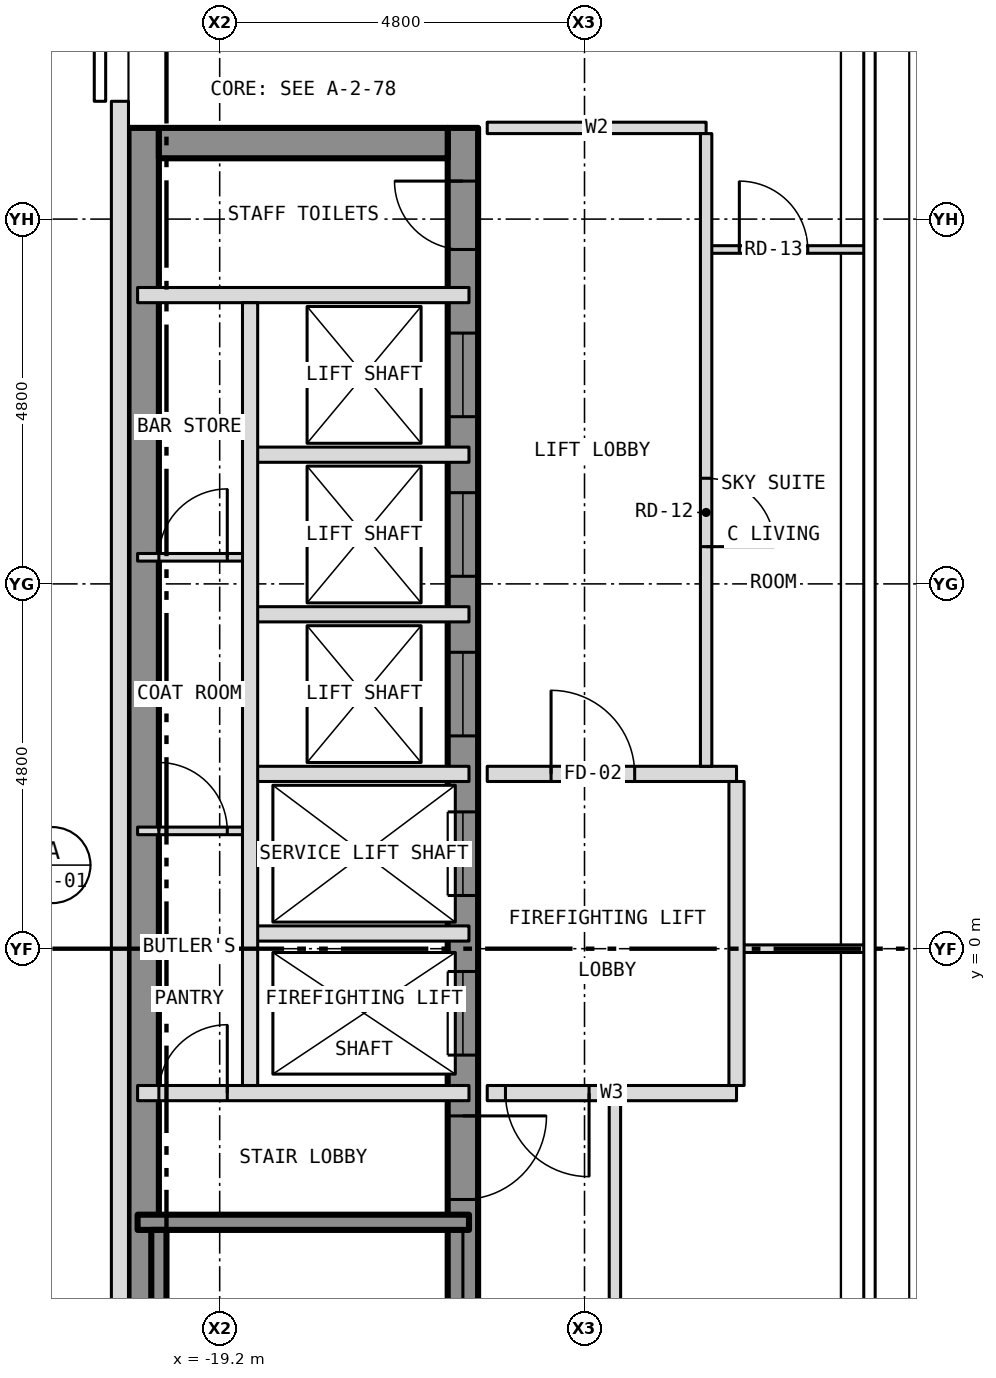
"""IFC4 building model, lengths in metres.
Left out: names, types, materials, properties, quantities, classifications, styles, units other than length and angle.
Written with IfcOpenShell. Run it as: python <this file> out.ifc"""

import sys

from ifc_helpers import new_model, si_unit, direction, frame, frame_2d, origin, place, context, subcontext, project, spatial, rectangle, extrude, element, fill, save


model = new_model("IFC4")
c1 = context("Model", 3, precision=1e-05, world=origin(), true_north=direction((0.0, 1.0)))
c2 = subcontext(c1, "Body", "Model", "MODEL_VIEW")
j1 = project(units=[si_unit("LENGTHUNIT", "METRE"), si_unit("PLANEANGLEUNIT", "RADIAN")], contexts=[c1])
p1 = place(None, origin())
s1 = spatial("IfcSite", under=j1, at=p1, CompositionType="ELEMENT")
p2 = place(p1, origin())
s2 = spatial("IfcBuilding", under=s1, at=p2, CompositionType="ELEMENT")
p3 = place(p2, frame((0.0, 0.0, 283.0)))
s3 = spatial("IfcBuildingStorey", under=s2, at=p3, CompositionType="ELEMENT", Elevation=283.0)
p4 = place(p3, frame((-16.0, -10.8, 0.0), z_axis=(0.0, 0.0, 1.0), x_axis=(0.0, 1.0, 0.0)))
e1 = element("IfcWall", 1, at=p4, inside=s3, PredefinedType="SHEAR", context=c2, shape_type="SweptSolid", body=[
    extrude(rectangle(XDim=21.6, YDim=0.4, at=frame_2d((10.8, 0.0))), origin(), (0.0, 0.0, 1.0), 3.25),
])
p5 = place(p4, frame((9.4, 0.0, 0.0)))
e2 = element("IfcOpeningElement", 2, at=p5, cuts=e1, PredefinedType="OPENING", context=c2, shape_type="SweptSolid", body=[
    extrude(rectangle(XDim=1.1, YDim=2.1, at=frame_2d((0.55, 1.05))), frame((0.0, 0.212, 0.0), z_axis=(0.0, -1.0, 0.0), x_axis=(1.0, 0.0, 0.0)), (0.0, 0.0, 1.0), 0.424),
])
p6 = place(p4, frame((11.5, 0.0, 0.0)))
e3 = element("IfcOpeningElement", 3, at=p6, cuts=e1, PredefinedType="OPENING", context=c2, shape_type="SweptSolid", body=[
    extrude(rectangle(XDim=1.1, YDim=2.1, at=frame_2d((0.55, 1.05))), frame((0.0, 0.212, 0.0), z_axis=(0.0, -1.0, 0.0), x_axis=(1.0, 0.0, 0.0)), (0.0, 0.0, 1.0), 0.424),
])
p7 = place(p4, frame((13.6, 0.0, 0.0)))
e4 = element("IfcOpeningElement", 4, at=p7, cuts=e1, PredefinedType="OPENING", context=c2, shape_type="SweptSolid", body=[
    extrude(rectangle(XDim=1.1, YDim=2.1, at=frame_2d((0.55, 1.05))), frame((0.0, 0.212, 0.0), z_axis=(0.0, -1.0, 0.0), x_axis=(1.0, 0.0, 0.0)), (0.0, 0.0, 1.0), 0.424),
])
p8 = place(p4, frame((15.7, 0.0, 0.0)))
e5 = element("IfcOpeningElement", 5, at=p8, cuts=e1, PredefinedType="OPENING", context=c2, shape_type="SweptSolid", body=[
    extrude(rectangle(XDim=1.1, YDim=2.1, at=frame_2d((0.55, 1.05))), frame((0.0, 0.212, 0.0), z_axis=(0.0, -1.0, 0.0), x_axis=(1.0, 0.0, 0.0)), (0.0, 0.0, 1.0), 0.424),
])
p9 = place(p4, frame((17.8, 0.0, 0.0)))
e6 = element("IfcOpeningElement", 6, at=p9, cuts=e1, PredefinedType="OPENING", context=c2, shape_type="SweptSolid", body=[
    extrude(rectangle(XDim=1.1, YDim=2.1, at=frame_2d((0.55, 1.05))), frame((0.0, 0.212, 0.0), z_axis=(0.0, -1.0, 0.0), x_axis=(1.0, 0.0, 0.0)), (0.0, 0.0, 1.0), 0.424),
])
p10 = place(p4, frame((0.458, 0.0, 0.0)))
e7 = element("IfcOpeningElement", 7, at=p10, cuts=e1, PredefinedType="OPENING", context=c2, shape_type="SweptSolid", body=[
    extrude(rectangle(XDim=1.1, YDim=2.1, at=frame_2d((0.55, 1.05))), frame((0.0, 0.212, 0.0), z_axis=(0.0, -1.0, 0.0), x_axis=(1.0, 0.0, 0.0)), (0.0, 0.0, 1.0), 0.424),
])
p11 = place(p4, frame((7.5, 0.0, 0.0)))
e8 = element("IfcOpeningElement", 8, at=p11, cuts=e1, PredefinedType="OPENING", context=c2, shape_type="SweptSolid", body=[
    extrude(rectangle(XDim=1.1, YDim=2.1, at=frame_2d((0.55, 1.05))), frame((0.0, 0.212, 0.0), z_axis=(0.0, -1.0, 0.0), x_axis=(1.0, 0.0, 0.0)), (0.0, 0.0, 1.0), 0.424),
])
p12 = place(p4, frame((20.0, 0.0, 0.0)))
e9 = element("IfcOpeningElement", 9, at=p12, cuts=e1, PredefinedType="OPENING", context=c2, shape_type="SweptSolid", body=[
    extrude(rectangle(XDim=0.9, YDim=2.1, at=frame_2d((0.45, 1.05))), frame((0.0, 0.212, 0.0), z_axis=(0.0, -1.0, 0.0), x_axis=(1.0, 0.0, 0.0)), (0.0, 0.0, 1.0), 0.424),
])
p13 = place(p3, frame((-20.2, -10.8, 0.0), z_axis=(0.0, 0.0, 1.0), x_axis=(0.0, 1.0, 0.0)))
e10 = element("IfcWall", 10, at=p13, inside=s3, PredefinedType="SHEAR", context=c2, shape_type="SweptSolid", body=[
    extrude(rectangle(XDim=21.6, YDim=0.4, at=frame_2d((10.8, 0.0))), origin(), (0.0, 0.0, 1.0), 3.25),
])
p14 = place(p3, frame((-20.0, 10.6, 0.0), z_axis=(0.0, 0.0, 1.0), x_axis=(1.0, 0.0, 0.0)))
e11 = element("IfcWall", 11, at=p14, inside=s3, PredefinedType="SHEAR", context=c2, shape_type="SweptSolid", body=[
    extrude(rectangle(XDim=3.8, YDim=0.4, at=frame_2d((1.9, 0.0))), origin(), (0.0, 0.0, 1.0), 3.25),
])
p15 = place(p3, frame((-20.512, 11.15, 0.0), z_axis=(0.0, 0.0, 1.0), x_axis=(0.0, -1.0, 0.0)))
e12 = element("IfcWall", 12, at=p15, inside=s3, PredefinedType="SOLIDWALL", context=c2, shape_type="SweptSolid", body=[
    extrude(rectangle(XDim=22.3, YDim=0.225, at=frame_2d((11.15, 0.0))), origin(), (0.0, 0.0, 1.0), 3.5),
])
p16 = place(p15, frame((18.4, 0.0, 1.0)))
e13 = element("IfcOpeningElement", 13, at=p16, cuts=e12, PredefinedType="OPENING", context=c2, shape_type="SweptSolid", body=[
    extrude(rectangle(XDim=0.6, YDim=1.5, at=frame_2d((0.3, 0.75))), frame((0.0, 0.125, 0.0), z_axis=(0.0, -1.0, 0.0), x_axis=(1.0, 0.0, 0.0)), (0.0, 0.0, 1.0), 0.249),
])
p17 = place(p3, frame((-20.28, -3.6, 0.0), z_axis=(0.0, 0.0, 1.0), x_axis=(1.0, 0.0, 0.0)))
e14 = element("IfcWall", 14, at=p17, inside=s3, PredefinedType="SHEAR", context=c2, shape_type="SweptSolid", body=[
    extrude(rectangle(XDim=4.36, YDim=0.2, at=frame_2d((2.18, 0.0))), origin(), (0.0, 0.0, 1.0), 3.25),
])
p18 = place(p3, frame((-20.28, -1.9, 0.0), z_axis=(0.0, 0.0, 1.0), x_axis=(1.0, 0.0, 0.0)))
e15 = element("IfcWall", 15, at=p18, inside=s3, PredefinedType="PARTITIONING", context=c2, shape_type="SweptSolid", body=[
    extrude(rectangle(XDim=4.36, YDim=0.2, at=frame_2d((2.18, 0.0))), origin(), (0.0, 0.0, 1.0), 3.25),
])
p19 = place(p18, frame((0.28, 0.0, 0.0)))
e16 = element("IfcOpeningElement", 16, at=p19, cuts=e15, PredefinedType="OPENING", context=c2, shape_type="SweptSolid", body=[
    extrude(rectangle(XDim=0.9, YDim=2.1, at=frame_2d((0.45, 1.05))), frame((0.0, 0.112, 0.0), z_axis=(0.0, -1.0, 0.0), x_axis=(1.0, 0.0, 0.0)), (0.0, 0.0, 1.0), 0.224),
])
p20 = place(p3, frame((-15.68, -1.9, 0.0), z_axis=(0.0, 0.0, 1.0), x_axis=(1.0, 0.0, 0.0)))
e17 = element("IfcWall", 17, at=p20, inside=s3, PredefinedType="PARTITIONING", context=c2, shape_type="SweptSolid", body=[
    extrude(rectangle(XDim=3.28, YDim=0.2, at=frame_2d((1.64, 0.0))), origin(), (0.0, 0.0, 1.0), 3.35),
])
p21 = place(p20, frame((0.24, 0.0, 0.0)))
e18 = element("IfcOpeningElement", 18, at=p21, cuts=e17, PredefinedType="OPENING", context=c2, shape_type="SweptSolid", body=[
    extrude(rectangle(XDim=1.1, YDim=2.1, at=frame_2d((0.55, 1.05))), frame((0.0, 0.112, 0.0), z_axis=(0.0, -1.0, 0.0), x_axis=(1.0, 0.0, 0.0)), (0.0, 0.0, 1.0), 0.224),
])
p22 = place(p3, frame((-12.4, 0.0, 0.0), z_axis=(0.0, 0.0, 1.0), x_axis=(1.0, 0.0, 0.0)))
e19 = element("IfcWall", 19, at=p22, inside=s3, PredefinedType="PARTITIONING", context=c2, shape_type="SweptSolid", body=[
    extrude(rectangle(XDim=1.704, YDim=0.1, at=frame_2d((0.852, 0.0))), origin(), (0.0, 0.0, 1.0), 2.728),
])
p23 = place(p3, frame((-18.8, 0.2, 0.0), z_axis=(0.0, 0.0, 1.0), x_axis=(1.0, 0.0, 0.0)))
e20 = element("IfcWall", 20, at=p23, inside=s3, PredefinedType="PARTITIONING", context=c2, shape_type="SweptSolid", body=[
    extrude(rectangle(XDim=2.88, YDim=0.2, at=frame_2d((1.44, 0.0))), origin(), (0.0, 0.0, 1.0), 3.25),
])
p24 = place(p3, frame((-20.28, 1.55, 0.0), z_axis=(0.0, 0.0, 1.0), x_axis=(1.0, 0.0, 0.0)))
e21 = element("IfcWall", 21, at=p24, inside=s3, PredefinedType="PARTITIONING", context=c2, shape_type="SweptSolid", body=[
    extrude(rectangle(XDim=1.48, YDim=0.1, at=frame_2d((0.74, 0.0))), origin(), (0.0, 0.0, 1.0), 3.25),
])
p25 = place(p24, frame((0.28, 0.0, 0.0)))
e22 = element("IfcOpeningElement", 22, at=p25, cuts=e21, PredefinedType="OPENING", context=c2, shape_type="SweptSolid", body=[
    extrude(rectangle(XDim=0.9, YDim=2.1, at=frame_2d((0.45, 1.05))), frame((0.0, 0.062, 0.0), z_axis=(0.0, -1.0, 0.0), x_axis=(1.0, 0.0, 0.0)), (0.0, 0.0, 1.0), 0.124),
])
p26 = place(p3, frame((-18.8, 2.3, 0.0), z_axis=(0.0, 0.0, 1.0), x_axis=(1.0, 0.0, 0.0)))
e23 = element("IfcWall", 23, at=p26, inside=s3, PredefinedType="PARTITIONING", context=c2, shape_type="SweptSolid", body=[
    extrude(rectangle(XDim=2.88, YDim=0.2, at=frame_2d((1.44, 0.0))), origin(), (0.0, 0.0, 1.0), 3.25),
])
p27 = place(p3, frame((-15.68, 2.3, 0.0), z_axis=(0.0, 0.0, 1.0), x_axis=(1.0, 0.0, 0.0)))
e24 = element("IfcWall", 24, at=p27, inside=s3, PredefinedType="PARTITIONING", context=c2, shape_type="SweptSolid", body=[
    extrude(rectangle(XDim=3.28, YDim=0.2, at=frame_2d((1.64, 0.0))), origin(), (0.0, 0.0, 1.0), 3.35),
])
p28 = place(p27, frame((0.84, 0.0, 0.0)))
e25 = element("IfcOpeningElement", 25, at=p28, cuts=e24, PredefinedType="OPENING", context=c2, shape_type="SweptSolid", body=[
    extrude(rectangle(XDim=1.1, YDim=2.1, at=frame_2d((0.55, 1.05))), frame((0.0, 0.112, 0.0), z_axis=(0.0, -1.0, 0.0), x_axis=(1.0, 0.0, 0.0)), (0.0, 0.0, 1.0), 0.224),
])
p29 = place(p3, frame((-18.8, 4.4, 0.0), z_axis=(0.0, 0.0, 1.0), x_axis=(1.0, 0.0, 0.0)))
e26 = element("IfcWall", 26, at=p29, inside=s3, PredefinedType="PARTITIONING", context=c2, shape_type="SweptSolid", body=[
    extrude(rectangle(XDim=2.88, YDim=0.2, at=frame_2d((1.44, 0.0))), origin(), (0.0, 0.0, 1.0), 3.25),
])
p30 = place(p3, frame((-20.28, 5.15, 0.0), z_axis=(0.0, 0.0, 1.0), x_axis=(1.0, 0.0, 0.0)))
e27 = element("IfcWall", 27, at=p30, inside=s3, PredefinedType="PARTITIONING", context=c2, shape_type="SweptSolid", body=[
    extrude(rectangle(XDim=1.48, YDim=0.1, at=frame_2d((0.74, 0.0))), origin(), (0.0, 0.0, 1.0), 3.25),
])
p31 = place(p30, frame((0.28, 0.0, 0.0)))
e28 = element("IfcOpeningElement", 28, at=p31, cuts=e27, PredefinedType="OPENING", context=c2, shape_type="SweptSolid", body=[
    extrude(rectangle(XDim=0.9, YDim=2.1, at=frame_2d((0.45, 1.05))), frame((0.0, 0.062, 0.0), z_axis=(0.0, -1.0, 0.0), x_axis=(1.0, 0.0, 0.0)), (0.0, 0.0, 1.0), 0.124),
])
p32 = place(p3, frame((-18.8, 6.5, 0.0), z_axis=(0.0, 0.0, 1.0), x_axis=(1.0, 0.0, 0.0)))
e29 = element("IfcWall", 29, at=p32, inside=s3, PredefinedType="PARTITIONING", context=c2, shape_type="SweptSolid", body=[
    extrude(rectangle(XDim=2.88, YDim=0.2, at=frame_2d((1.44, 0.0))), origin(), (0.0, 0.0, 1.0), 3.25),
])
p33 = place(p3, frame((-20.28, 8.6, 0.0), z_axis=(0.0, 0.0, 1.0), x_axis=(1.0, 0.0, 0.0)))
e30 = element("IfcWall", 30, at=p33, inside=s3, PredefinedType="PARTITIONING", context=c2, shape_type="SweptSolid", body=[
    extrude(rectangle(XDim=4.36, YDim=0.2, at=frame_2d((2.18, 0.0))), origin(), (0.0, 0.0, 1.0), 3.25),
])
p34 = place(p3, frame((-12.8, 9.2, 0.0), z_axis=(0.0, 0.0, 1.0), x_axis=(1.0, 0.0, 0.0)))
e31 = element("IfcWall", 31, at=p34, inside=s3, PredefinedType="PARTITIONING", context=c2, shape_type="SweptSolid", body=[
    extrude(rectangle(XDim=2.104, YDim=0.1, at=frame_2d((1.052, 0.0))), origin(), (0.0, 0.0, 1.0), 3.35),
])
p35 = place(p34, frame((0.437, 0.0, 0.0)))
e32 = element("IfcOpeningElement", 32, at=p35, cuts=e31, PredefinedType="OPENING", context=c2, shape_type="SweptSolid", body=[
    extrude(rectangle(XDim=0.9, YDim=2.1, at=frame_2d((0.45, 1.05))), frame((0.0, 0.062, 0.0), z_axis=(0.0, -1.0, 0.0), x_axis=(1.0, 0.0, 0.0)), (0.0, 0.0, 1.0), 0.124),
])
p36 = place(p3, frame((-15.68, 10.8, 0.0), z_axis=(0.0, 0.0, 1.0), x_axis=(1.0, 0.0, 0.0)))
e33 = element("IfcWall", 33, at=p36, inside=s3, PredefinedType="PARTITIONING", context=c2, shape_type="SweptSolid", body=[
    extrude(rectangle(XDim=2.88, YDim=0.15, at=frame_2d((1.44, 0.0))), origin(), (0.0, 0.0, 1.0), 3.35),
])
p37 = place(p3, frame((-20.0, -10.68, 0.0), z_axis=(0.0, 0.0, 1.0), x_axis=(0.0, 1.0, 0.0)))
e34 = element("IfcWall", 34, at=p37, inside=s3, PredefinedType="SHEAR", context=c2, shape_type="SweptSolid", body=[
    extrude(rectangle(XDim=6.98, YDim=0.2, at=frame_2d((3.49, 0.0))), origin(), (0.0, 0.0, 1.0), 3.25),
])
p38 = place(p3, frame((-18.8, -1.8, 0.0), z_axis=(0.0, 0.0, 1.0), x_axis=(0.0, 1.0, 0.0)))
e35 = element("IfcWall", 35, at=p38, inside=s3, PredefinedType="PARTITIONING", context=c2, shape_type="SweptSolid", body=[
    extrude(rectangle(XDim=10.3, YDim=0.2, at=frame_2d((5.15, 0.0))), origin(), (0.0, 0.0, 1.0), 3.25),
])
p39 = place(p3, frame((-14.0, -10.725, 0.0), z_axis=(0.0, 0.0, 1.0), x_axis=(0.0, 1.0, 0.0)))
e36 = element("IfcWall", 36, at=p39, inside=s3, PredefinedType="PARTITIONING", context=c2, shape_type="SweptSolid", body=[
    extrude(rectangle(XDim=8.725, YDim=0.15, at=frame_2d((4.363, 0.0))), origin(), (0.0, 0.0, 1.0), 3.35),
])
p40 = place(p39, frame((4.735, 0.0, 0.0)))
e37 = element("IfcOpeningElement", 37, at=p40, cuts=e36, PredefinedType="OPENING", context=c2, shape_type="SweptSolid", body=[
    extrude(rectangle(XDim=0.9, YDim=2.1, at=frame_2d((0.45, 1.05))), frame((0.0, 0.087, 0.0), z_axis=(0.0, -1.0, 0.0), x_axis=(1.0, 0.0, 0.0)), (0.0, 0.0, 1.0), 0.174),
])
p41 = place(p3, frame((-12.8, 2.4, 0.0), z_axis=(0.0, 0.0, 1.0), x_axis=(0.0, 1.0, 0.0)))
e38 = element("IfcWall", 38, at=p41, inside=s3, PredefinedType="PARTITIONING", context=c2, shape_type="SweptSolid", body=[
    extrude(rectangle(XDim=8.325, YDim=0.15, at=frame_2d((4.163, 0.0))), origin(), (0.0, 0.0, 1.0), 3.35),
])
p42 = place(p41, frame((2.89, 0.0, 0.0)))
e39 = element("IfcOpeningElement", 39, at=p42, cuts=e38, PredefinedType="OPENING", context=c2, shape_type="SweptSolid", body=[
    extrude(rectangle(XDim=0.9, YDim=2.1, at=frame_2d((0.45, 1.05))), frame((0.0, 0.087, 0.0), z_axis=(0.0, -1.0, 0.0), x_axis=(1.0, 0.0, 0.0)), (0.0, 0.0, 1.0), 0.174),
])
p43 = place(p3, frame((-12.4, -1.8, 0.0), z_axis=(0.0, 0.0, 1.0), x_axis=(0.0, 1.0, 0.0)))
e40 = element("IfcWall", 40, at=p43, inside=s3, PredefinedType="PARTITIONING", context=c2, shape_type="SweptSolid", body=[
    extrude(rectangle(XDim=4.0, YDim=0.2, at=frame_2d((2.0, 0.0))), origin(), (0.0, 0.0, 1.0), 3.35),
])
p44 = place(p5, origin())
e41 = element("IfcDoor", 41, at=p44, inside=s3, OperationType="SLIDING_TO_LEFT", PredefinedType="DOOR", context=c2, shape_type="SweptSolid", body=[
    extrude(rectangle(XDim=1.1, YDim=2.1, at=frame_2d((0.55, 1.05))), frame((0.0, 0.025, 0.0), z_axis=(0.0, -1.0, 0.0), x_axis=(1.0, 0.0, 0.0)), (0.0, 0.0, 1.0), 0.05),
])
fill(e2, e41)
p45 = place(p6, origin())
e42 = element("IfcDoor", 42, at=p45, inside=s3, OperationType="SLIDING_TO_LEFT", PredefinedType="DOOR", context=c2, shape_type="SweptSolid", body=[
    extrude(rectangle(XDim=1.1, YDim=2.1, at=frame_2d((0.55, 1.05))), frame((0.0, 0.025, 0.0), z_axis=(0.0, -1.0, 0.0), x_axis=(1.0, 0.0, 0.0)), (0.0, 0.0, 1.0), 0.05),
])
fill(e3, e42)
p46 = place(p7, origin())
e43 = element("IfcDoor", 43, at=p46, inside=s3, OperationType="SLIDING_TO_LEFT", PredefinedType="DOOR", context=c2, shape_type="SweptSolid", body=[
    extrude(rectangle(XDim=1.1, YDim=2.1, at=frame_2d((0.55, 1.05))), frame((0.0, 0.025, 0.0), z_axis=(0.0, -1.0, 0.0), x_axis=(1.0, 0.0, 0.0)), (0.0, 0.0, 1.0), 0.05),
])
fill(e4, e43)
p47 = place(p8, origin())
e44 = element("IfcDoor", 44, at=p47, inside=s3, OperationType="SLIDING_TO_LEFT", PredefinedType="DOOR", context=c2, shape_type="SweptSolid", body=[
    extrude(rectangle(XDim=1.1, YDim=2.1, at=frame_2d((0.55, 1.05))), frame((0.0, 0.025, 0.0), z_axis=(0.0, -1.0, 0.0), x_axis=(1.0, 0.0, 0.0)), (0.0, 0.0, 1.0), 0.05),
])
fill(e5, e44)
p48 = place(p9, origin())
e45 = element("IfcDoor", 45, at=p48, inside=s3, OperationType="SLIDING_TO_LEFT", PredefinedType="DOOR", context=c2, shape_type="SweptSolid", body=[
    extrude(rectangle(XDim=1.1, YDim=2.1, at=frame_2d((0.55, 1.05))), frame((0.0, 0.025, 0.0), z_axis=(0.0, -1.0, 0.0), x_axis=(1.0, 0.0, 0.0)), (0.0, 0.0, 1.0), 0.05),
])
fill(e6, e45)
p49 = place(p11, origin())
e46 = element("IfcDoor", 46, at=p49, inside=s3, OperationType="SINGLE_SWING_RIGHT", PredefinedType="DOOR", context=c2, shape_type="SweptSolid", body=[
    extrude(rectangle(XDim=1.1, YDim=2.1, at=frame_2d((0.55, 1.05))), frame((0.0, 0.025, 0.0), z_axis=(0.0, -1.0, 0.0), x_axis=(1.0, 0.0, 0.0)), (0.0, 0.0, 1.0), 0.05),
])
fill(e8, e46)
p50 = place(p12, origin())
e47 = element("IfcDoor", 47, at=p50, inside=s3, OperationType="SINGLE_SWING_RIGHT", PredefinedType="DOOR", context=c2, shape_type="SweptSolid", body=[
    extrude(rectangle(XDim=0.9, YDim=2.1, at=frame_2d((0.45, 1.05))), frame((0.0, 0.025, 0.0), z_axis=(0.0, -1.0, 0.0), x_axis=(1.0, 0.0, 0.0)), (0.0, 0.0, 1.0), 0.05),
])
fill(e9, e47)
p51 = place(p19, origin())
e48 = element("IfcDoor", 48, at=p51, inside=s3, OperationType="SINGLE_SWING_RIGHT", PredefinedType="DOOR", context=c2, shape_type="SweptSolid", body=[
    extrude(rectangle(XDim=0.9, YDim=2.1, at=frame_2d((0.45, 1.05))), frame((0.0, 0.025, 0.0), z_axis=(0.0, -1.0, 0.0), x_axis=(1.0, 0.0, 0.0)), (0.0, 0.0, 1.0), 0.05),
])
fill(e16, e48)
p52 = place(p25, origin())
e49 = element("IfcDoor", 49, at=p52, inside=s3, OperationType="SINGLE_SWING_LEFT", PredefinedType="DOOR", context=c2, shape_type="SweptSolid", body=[
    extrude(rectangle(XDim=0.9, YDim=2.1, at=frame_2d((0.45, 1.05))), frame((0.0, 0.025, 0.0), z_axis=(0.0, -1.0, 0.0), x_axis=(1.0, 0.0, 0.0)), (0.0, 0.0, 1.0), 0.05),
])
fill(e22, e49)
p53 = place(p31, origin())
e50 = element("IfcDoor", 50, at=p53, inside=s3, OperationType="SINGLE_SWING_RIGHT", PredefinedType="DOOR", context=c2, shape_type="SweptSolid", body=[
    extrude(rectangle(XDim=0.9, YDim=2.1, at=frame_2d((0.45, 1.05))), frame((0.0, 0.025, 0.0), z_axis=(0.0, -1.0, 0.0), x_axis=(1.0, 0.0, 0.0)), (0.0, 0.0, 1.0), 0.05),
])
fill(e28, e50)
p54 = place(p28, origin())
e51 = element("IfcDoor", 51, at=p54, inside=s3, OperationType="SINGLE_SWING_LEFT", PredefinedType="DOOR", context=c2, shape_type="SweptSolid", body=[
    extrude(rectangle(XDim=1.1, YDim=2.1, at=frame_2d((0.55, 1.05))), frame((0.0, 0.025, 0.0), z_axis=(0.0, -1.0, 0.0), x_axis=(1.0, 0.0, 0.0)), (0.0, 0.0, 1.0), 0.05),
])
fill(e25, e51)
p55 = place(p21, origin())
e52 = element("IfcDoor", 52, at=p55, inside=s3, OperationType="SINGLE_SWING_RIGHT", PredefinedType="DOOR", context=c2, shape_type="SweptSolid", body=[
    extrude(rectangle(XDim=1.1, YDim=2.1, at=frame_2d((0.55, 1.05))), frame((0.0, 0.025, 0.0), z_axis=(0.0, -1.0, 0.0), x_axis=(1.0, 0.0, 0.0)), (0.0, 0.0, 1.0), 0.05),
])
fill(e18, e52)
p56 = place(p42, origin())
e53 = element("IfcDoor", 53, at=p56, inside=s3, OperationType="SINGLE_SWING_LEFT", PredefinedType="DOOR", context=c2, shape_type="SweptSolid", body=[
    extrude(rectangle(XDim=0.9, YDim=2.1, at=frame_2d((0.45, 1.05))), frame((0.0, 0.025, 0.0), z_axis=(0.0, -1.0, 0.0), x_axis=(1.0, 0.0, 0.0)), (0.0, 0.0, 1.0), 0.05),
])
fill(e39, e53)
p57 = place(p35, origin())
e54 = element("IfcDoor", 54, at=p57, inside=s3, OperationType="SINGLE_SWING_LEFT", PredefinedType="DOOR", context=c2, shape_type="SweptSolid", body=[
    extrude(rectangle(XDim=0.9, YDim=2.1, at=frame_2d((0.45, 1.05))), frame((0.0, 0.025, 0.0), z_axis=(0.0, -1.0, 0.0), x_axis=(1.0, 0.0, 0.0)), (0.0, 0.0, 1.0), 0.05),
])
fill(e32, e54)
save(model, sys.argv[1])
